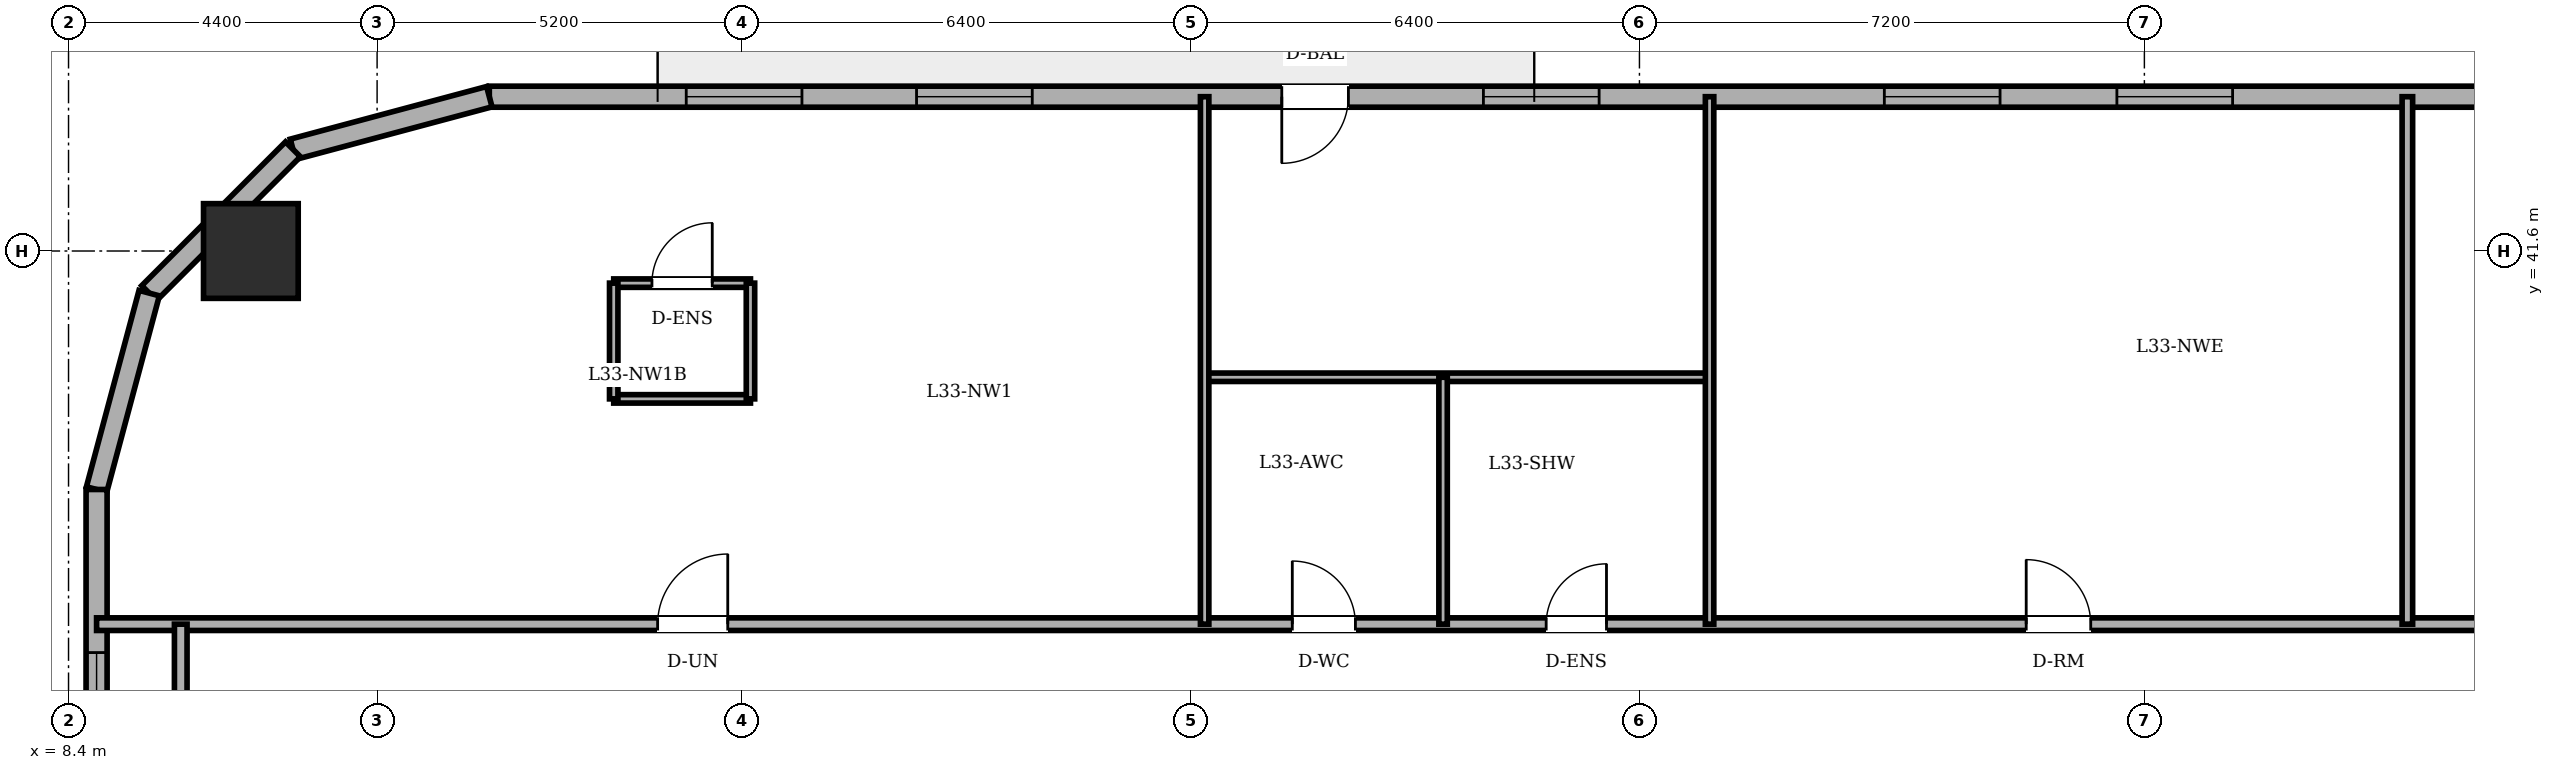
"""IFC4 building model, lengths in metres.
Left out: names, types, materials, properties, quantities, classifications, styles, units other than length and angle.
Written with IfcOpenShell. Run it as: python <this file> out.ifc"""

import sys

from ifc_helpers import new_model, si_unit, direction, frame, frame_2d, origin, origin_2d, place, context, subcontext, project, spatial, rectangle, circle, extrude, element, fill, save


model = new_model("IFC4")
c1 = context("Model", 3, precision=1e-05, world=origin(), true_north=direction((0.0, 1.0)))
c2 = subcontext(c1, "Body", "Model", "MODEL_VIEW")
j1 = project(units=[si_unit("LENGTHUNIT", "METRE"), si_unit("PLANEANGLEUNIT", "RADIAN")], contexts=[c1])
p1 = place(None, origin())
s1 = spatial("IfcSite", under=j1, at=p1, CompositionType="ELEMENT")
p2 = place(p1, origin())
s2 = spatial("IfcBuilding", under=s1, at=p2, CompositionType="ELEMENT")
p3 = place(p2, frame((0.0, 0.0, 125.9)))
s3 = spatial("IfcBuildingStorey", under=s2, at=p3, CompositionType="ELEMENT", Elevation=125.9)
p4 = place(p3, frame((11.0, 41.6, 0.0), z_axis=(0.0, 0.0, 1.0), x_axis=(1.0, 0.0, 0.0)))
e1 = element("IfcColumn", 1, at=p4, inside=s3, PredefinedType="COLUMN", context=c2, shape_type="SweptSolid", body=[
    extrude(circle(Radius=0.675, at=origin_2d()), origin(), (0.0, 0.0, 1.0), 3.6),
])
p5 = place(p3, frame((44.333, 43.8, 0.0), z_axis=(0.0, 0.0, 1.0), x_axis=(-1.0, 0.0, 0.0)))
e2 = element("IfcWall", 2, at=p5, inside=s3, PredefinedType="SOLIDWALL", context=c2, shape_type="SweptSolid", body=[
    extrude(rectangle(XDim=29.933, YDim=0.3, at=frame_2d((14.967, 0.0))), origin(), (0.0, 0.0, 1.0), 3.4),
])
p6 = place(p5, frame((17.683, 0.0, 0.0)))
e3 = element("IfcOpeningElement", 3, at=p6, cuts=e2, PredefinedType="OPENING", context=c2, shape_type="SweptSolid", body=[
    extrude(rectangle(XDim=0.95, YDim=2.2, at=frame_2d((0.475, 1.1))), frame((0.0, 0.16, 0.0), z_axis=(0.0, -1.0, 0.0), x_axis=(1.0, 0.0, 0.0)), (0.0, 0.0, 1.0), 0.32),
])
p7 = place(p5, frame((5.075, 0.0, 0.85)))
e4 = element("IfcOpeningElement", 4, at=p7, cuts=e2, PredefinedType="OPENING", context=c2, shape_type="SweptSolid", body=[
    extrude(rectangle(XDim=1.65, YDim=1.55, at=frame_2d((0.825, 0.775))), frame((0.0, 0.16, 0.0), z_axis=(0.0, -1.0, 0.0), x_axis=(1.0, 0.0, 0.0)), (0.0, 0.0, 1.0), 0.32),
])
p8 = place(p5, frame((8.391, 0.0, 0.85)))
e5 = element("IfcOpeningElement", 5, at=p8, cuts=e2, PredefinedType="OPENING", context=c2, shape_type="SweptSolid", body=[
    extrude(rectangle(XDim=1.65, YDim=1.55, at=frame_2d((0.825, 0.775))), frame((0.0, 0.16, 0.0), z_axis=(0.0, -1.0, 0.0), x_axis=(1.0, 0.0, 0.0)), (0.0, 0.0, 1.0), 0.32),
])
p9 = place(p5, frame((14.108, 0.0, 0.85)))
e6 = element("IfcOpeningElement", 6, at=p9, cuts=e2, PredefinedType="OPENING", context=c2, shape_type="SweptSolid", body=[
    extrude(rectangle(XDim=1.65, YDim=1.55, at=frame_2d((0.825, 0.775))), frame((0.0, 0.16, 0.0), z_axis=(0.0, -1.0, 0.0), x_axis=(1.0, 0.0, 0.0)), (0.0, 0.0, 1.0), 0.32),
])
p10 = place(p5, frame((22.191, 0.0, 0.85)))
e7 = element("IfcOpeningElement", 7, at=p10, cuts=e2, PredefinedType="OPENING", context=c2, shape_type="SweptSolid", body=[
    extrude(rectangle(XDim=1.65, YDim=1.55, at=frame_2d((0.825, 0.775))), frame((0.0, 0.16, 0.0), z_axis=(0.0, -1.0, 0.0), x_axis=(1.0, 0.0, 0.0)), (0.0, 0.0, 1.0), 0.32),
])
p11 = place(p5, frame((25.475, 0.0, 0.85)))
e8 = element("IfcOpeningElement", 8, at=p11, cuts=e2, PredefinedType="OPENING", context=c2, shape_type="SweptSolid", body=[
    extrude(rectangle(XDim=1.65, YDim=1.55, at=frame_2d((0.825, 0.775))), frame((0.0, 0.16, 0.0), z_axis=(0.0, -1.0, 0.0), x_axis=(1.0, 0.0, 0.0)), (0.0, 0.0, 1.0), 0.32),
])
p12 = place(p3, frame((14.4, 43.8, 0.0), z_axis=(0.0, 0.0, 1.0), x_axis=(-0.965943540406, -0.258752926066, 0.0)))
e9 = element("IfcWall", 9, at=p12, inside=s3, PredefinedType="SOLIDWALL", context=c2, shape_type="SweptSolid", body=[
    extrude(rectangle(XDim=2.898, YDim=0.3, at=frame_2d((1.449, 0.0))), origin(), (0.0, 0.0, 1.0), 3.4),
])
p13 = place(p3, frame((11.6, 43.05, 0.0), z_axis=(0.0, 0.0, 1.0), x_axis=(-0.707106781187, -0.707106781187, 0.0)))
e10 = element("IfcWall", 10, at=p13, inside=s3, PredefinedType="SOLIDWALL", context=c2, shape_type="SweptSolid", body=[
    extrude(rectangle(XDim=2.899, YDim=0.3, at=frame_2d((1.45, 0.0))), origin(), (0.0, 0.0, 1.0), 3.4),
])
p14 = place(p3, frame((9.55, 41.0, 0.0), z_axis=(0.0, 0.0, 1.0), x_axis=(-0.258731875344, -0.96594917914, 0.0)))
e11 = element("IfcWall", 11, at=p14, inside=s3, PredefinedType="SOLIDWALL", context=c2, shape_type="SweptSolid", body=[
    extrude(rectangle(XDim=2.899, YDim=0.3, at=frame_2d((1.449, 0.0))), origin(), (0.0, 0.0, 1.0), 3.4),
])
p15 = place(p3, frame((8.8, 38.2, 0.0), z_axis=(0.0, 0.0, 1.0), x_axis=(0.0, -1.0, 0.0)))
e12 = element("IfcWall", 12, at=p15, inside=s3, PredefinedType="SOLIDWALL", context=c2, shape_type="SweptSolid", body=[
    extrude(rectangle(XDim=28.4, YDim=0.3, at=frame_2d((14.2, 0.0))), origin(), (0.0, 0.0, 1.0), 3.4),
])
p16 = place(p15, frame((2.325, 0.0, 0.85)))
e13 = element("IfcOpeningElement", 13, at=p16, cuts=e12, PredefinedType="OPENING", context=c2, shape_type="SweptSolid", body=[
    extrude(rectangle(XDim=1.65, YDim=1.55, at=frame_2d((0.825, 0.775))), frame((0.0, 0.16, 0.0), z_axis=(0.0, -1.0, 0.0), x_axis=(1.0, 0.0, 0.0)), (0.0, 0.0, 1.0), 0.32),
])
p17 = place(p15, frame((6.828, 0.0, 0.85)))
e14 = element("IfcOpeningElement", 14, at=p17, cuts=e12, PredefinedType="OPENING", context=c2, shape_type="SweptSolid", body=[
    extrude(rectangle(XDim=1.65, YDim=1.55, at=frame_2d((0.825, 0.775))), frame((0.0, 0.16, 0.0), z_axis=(0.0, -1.0, 0.0), x_axis=(1.0, 0.0, 0.0)), (0.0, 0.0, 1.0), 0.32),
])
p18 = place(p15, frame((10.102, 0.0, 0.85)))
e15 = element("IfcOpeningElement", 15, at=p18, cuts=e12, PredefinedType="OPENING", context=c2, shape_type="SweptSolid", body=[
    extrude(rectangle(XDim=1.65, YDim=1.55, at=frame_2d((0.825, 0.775))), frame((0.0, 0.16, 0.0), z_axis=(0.0, -1.0, 0.0), x_axis=(1.0, 0.0, 0.0)), (0.0, 0.0, 1.0), 0.32),
])
p19 = place(p15, frame((16.648, 0.0, 0.85)))
e16 = element("IfcOpeningElement", 16, at=p19, cuts=e12, PredefinedType="OPENING", context=c2, shape_type="SweptSolid", body=[
    extrude(rectangle(XDim=1.65, YDim=1.55, at=frame_2d((0.825, 0.775))), frame((0.0, 0.16, 0.0), z_axis=(0.0, -1.0, 0.0), x_axis=(1.0, 0.0, 0.0)), (0.0, 0.0, 1.0), 0.32),
])
p20 = place(p15, frame((19.922, 0.0, 0.85)))
e17 = element("IfcOpeningElement", 17, at=p20, cuts=e12, PredefinedType="OPENING", context=c2, shape_type="SweptSolid", body=[
    extrude(rectangle(XDim=1.65, YDim=1.55, at=frame_2d((0.825, 0.775))), frame((0.0, 0.16, 0.0), z_axis=(0.0, -1.0, 0.0), x_axis=(1.0, 0.0, 0.0)), (0.0, 0.0, 1.0), 0.32),
])
p21 = place(p15, frame((24.425, 0.0, 0.85)))
e18 = element("IfcOpeningElement", 18, at=p21, cuts=e12, PredefinedType="OPENING", context=c2, shape_type="SweptSolid", body=[
    extrude(rectangle(XDim=1.65, YDim=1.55, at=frame_2d((0.825, 0.775))), frame((0.0, 0.16, 0.0), z_axis=(0.0, -1.0, 0.0), x_axis=(1.0, 0.0, 0.0)), (0.0, 0.0, 1.0), 0.32),
])
p22 = place(p3, frame((16.174, 41.142, 0.0), z_axis=(0.0, 0.0, 1.0), x_axis=(1.0, 0.0, 0.0)))
e19 = element("IfcWall", 19, at=p22, inside=s3, PredefinedType="PARTITIONING", context=c2, shape_type="SweptSolid", body=[
    extrude(rectangle(XDim=1.95, YDim=0.12, at=frame_2d((0.975, 0.0))), origin(), (0.0, 0.0, 1.0), 3.4),
])
p23 = place(p22, frame((0.545, 0.0, 0.0)))
e20 = element("IfcOpeningElement", 20, at=p23, cuts=e19, PredefinedType="OPENING", context=c2, shape_type="SweptSolid", body=[
    extrude(rectangle(XDim=0.86, YDim=2.1, at=frame_2d((0.43, 1.05))), frame((0.0, 0.07, 0.0), z_axis=(0.0, -1.0, 0.0), x_axis=(1.0, 0.0, 0.0)), (0.0, 0.0, 1.0), 0.14),
])
p24 = place(p3, frame((18.124, 39.492, 0.0), z_axis=(0.0, 0.0, 1.0), x_axis=(-1.0, 0.0, 0.0)))
e21 = element("IfcWall", 21, at=p24, inside=s3, PredefinedType="PARTITIONING", context=c2, shape_type="SweptSolid", body=[
    extrude(rectangle(XDim=1.95, YDim=0.12, at=frame_2d((0.975, 0.0))), origin(), (0.0, 0.0, 1.0), 3.4),
])
for number, where, z_axis, x_axis in (
    (22, (16.174, 41.142, 0.0), (0.0, 0.0, 1.0), (0.0, -1.0, 0.0)),
    (23, (18.124, 39.492, 0.0), (0.0, 0.0, 1.0), (0.0, 1.0, 0.0)),
):
    element("IfcWall", number, at=place(p3, frame(where, z_axis=z_axis, x_axis=x_axis)), inside=s3, PredefinedType="PARTITIONING", context=c2, shape_type="SweptSolid", body=[
        extrude(rectangle(XDim=1.65, YDim=0.12, at=frame_2d((0.825, 0.0))), origin(), (0.0, 0.0, 1.0), 3.4),
    ])
p25 = place(p3, frame((8.8, 36.28, 0.0), z_axis=(0.0, 0.0, 1.0), x_axis=(1.0, 0.0, 0.0)))
e24 = element("IfcWall", 24, at=p25, inside=s3, PredefinedType="PARTITIONING", context=c2, shape_type="SweptSolid", body=[
    extrude(rectangle(XDim=47.141, YDim=0.18, at=frame_2d((23.57, 0.0))), origin(), (0.0, 0.0, 1.0), 3.4),
])
p26 = place(p25, frame((17.05, 0.0, 0.0)))
e25 = element("IfcOpeningElement", 25, at=p26, cuts=e24, PredefinedType="OPENING", context=c2, shape_type="SweptSolid", body=[
    extrude(rectangle(XDim=0.9, YDim=2.1, at=frame_2d((0.45, 1.05))), frame((0.0, 0.1, 0.0), z_axis=(0.0, -1.0, 0.0), x_axis=(1.0, 0.0, 0.0)), (0.0, 0.0, 1.0), 0.2),
])
p27 = place(p25, frame((20.67, 0.0, 0.0)))
e26 = element("IfcOpeningElement", 26, at=p27, cuts=e24, PredefinedType="OPENING", context=c2, shape_type="SweptSolid", body=[
    extrude(rectangle(XDim=0.86, YDim=2.1, at=frame_2d((0.43, 1.05))), frame((0.0, 0.1, 0.0), z_axis=(0.0, -1.0, 0.0), x_axis=(1.0, 0.0, 0.0)), (0.0, 0.0, 1.0), 0.2),
])
p28 = place(p25, frame((34.95, 0.0, 0.0)))
e27 = element("IfcOpeningElement", 27, at=p28, cuts=e24, PredefinedType="OPENING", context=c2, shape_type="SweptSolid", body=[
    extrude(rectangle(XDim=1.0, YDim=2.15, at=frame_2d((0.5, 1.075))), frame((0.0, 0.1, 0.0), z_axis=(0.0, -1.0, 0.0), x_axis=(1.0, 0.0, 0.0)), (0.0, 0.0, 1.0), 0.2),
])
p29 = place(p25, frame((8.0, 0.0, 0.0)))
e28 = element("IfcOpeningElement", 28, at=p29, cuts=e24, PredefinedType="OPENING", context=c2, shape_type="SweptSolid", body=[
    extrude(rectangle(XDim=1.0, YDim=2.15, at=frame_2d((0.5, 1.075))), frame((0.0, 0.1, 0.0), z_axis=(0.0, -1.0, 0.0), x_axis=(1.0, 0.0, 0.0)), (0.0, 0.0, 1.0), 0.2),
])
p30 = place(p25, frame((27.515, 0.0, 0.0)))
e29 = element("IfcOpeningElement", 29, at=p30, cuts=e24, PredefinedType="OPENING", context=c2, shape_type="SweptSolid", body=[
    extrude(rectangle(XDim=0.92, YDim=2.1, at=frame_2d((0.46, 1.05))), frame((0.0, 0.1, 0.0), z_axis=(0.0, -1.0, 0.0), x_axis=(1.0, 0.0, 0.0)), (0.0, 0.0, 1.0), 0.2),
])
p31 = place(p3, frame((24.6, 39.8, 0.0), z_axis=(0.0, 0.0, 1.0), x_axis=(1.0, 0.0, 0.0)))
e30 = element("IfcWall", 30, at=p31, inside=s3, PredefinedType="PARTITIONING", context=c2, shape_type="SweptSolid", body=[
    extrude(rectangle(XDim=7.2, YDim=0.12, at=frame_2d((3.6, 0.0))), origin(), (0.0, 0.0, 1.0), 3.4),
])
p32 = place(p3, frame((10.0, 33.82, 0.0), z_axis=(0.0, 0.0, 1.0), x_axis=(0.0, 1.0, 0.0)))
e31 = element("IfcWall", 31, at=p32, inside=s3, PredefinedType="PARTITIONING", context=c2, shape_type="SweptSolid", body=[
    extrude(rectangle(XDim=2.46, YDim=0.18, at=frame_2d((1.23, 0.0))), origin(), (0.0, 0.0, 1.0), 3.4),
])
p33 = place(p3, frame((24.6, 36.28, 0.0), z_axis=(0.0, 0.0, 1.0), x_axis=(0.0, 1.0, 0.0)))
e32 = element("IfcWall", 32, at=p33, inside=s3, PredefinedType="PARTITIONING", context=c2, shape_type="SweptSolid", body=[
    extrude(rectangle(XDim=7.52, YDim=0.12, at=frame_2d((3.76, 0.0))), origin(), (0.0, 0.0, 1.0), 3.4),
])
p34 = place(p3, frame((28.0, 36.28, 0.0), z_axis=(0.0, 0.0, 1.0), x_axis=(0.0, 1.0, 0.0)))
e33 = element("IfcWall", 33, at=p34, inside=s3, PredefinedType="PARTITIONING", context=c2, shape_type="SweptSolid", body=[
    extrude(rectangle(XDim=3.52, YDim=0.12, at=frame_2d((1.76, 0.0))), origin(), (0.0, 0.0, 1.0), 3.4),
])
p35 = place(p3, frame((31.8, 36.28, 0.0), z_axis=(0.0, 0.0, 1.0), x_axis=(0.0, 1.0, 0.0)))
e34 = element("IfcWall", 34, at=p35, inside=s3, PredefinedType="PARTITIONING", context=c2, shape_type="SweptSolid", body=[
    extrude(rectangle(XDim=7.52, YDim=0.12, at=frame_2d((3.76, 0.0))), origin(), (0.0, 0.0, 1.0), 3.4),
])
p36 = place(p3, frame((41.75, 36.28, 0.0), z_axis=(0.0, 0.0, 1.0), x_axis=(0.0, 1.0, 0.0)))
e35 = element("IfcWall", 35, at=p36, inside=s3, PredefinedType="PARTITIONING", context=c2, shape_type="SweptSolid", body=[
    extrude(rectangle(XDim=7.52, YDim=0.15, at=frame_2d((3.76, 0.0))), origin(), (0.0, 0.0, 1.0), 3.4),
])
p37 = place(p6, origin())
e36 = element("IfcDoor", 36, at=p37, inside=s3, OperationType="SINGLE_SWING_RIGHT", PredefinedType="DOOR", context=c2, shape_type="SweptSolid", body=[
    extrude(rectangle(XDim=0.95, YDim=2.2, at=frame_2d((0.475, 1.1))), frame((0.0, 0.025, 0.0), z_axis=(0.0, -1.0, 0.0), x_axis=(1.0, 0.0, 0.0)), (0.0, 0.0, 1.0), 0.05),
])
fill(e3, e36)
p38 = place(p7, origin())
e37 = element("IfcWindow", 37, at=p38, inside=s3, PartitioningType="DOUBLE_PANEL_VERTICAL", PredefinedType="WINDOW", context=c2, shape_type="SweptSolid", body=[
    extrude(rectangle(XDim=1.65, YDim=1.55, at=frame_2d((0.825, 0.775))), frame((0.0, 0.03, 0.0), z_axis=(0.0, -1.0, 0.0), x_axis=(1.0, 0.0, 0.0)), (0.0, 0.0, 1.0), 0.06),
])
fill(e4, e37)
p39 = place(p8, origin())
e38 = element("IfcWindow", 38, at=p39, inside=s3, PartitioningType="DOUBLE_PANEL_VERTICAL", PredefinedType="WINDOW", context=c2, shape_type="SweptSolid", body=[
    extrude(rectangle(XDim=1.65, YDim=1.55, at=frame_2d((0.825, 0.775))), frame((0.0, 0.03, 0.0), z_axis=(0.0, -1.0, 0.0), x_axis=(1.0, 0.0, 0.0)), (0.0, 0.0, 1.0), 0.06),
])
fill(e5, e38)
p40 = place(p9, origin())
e39 = element("IfcWindow", 39, at=p40, inside=s3, PartitioningType="DOUBLE_PANEL_VERTICAL", PredefinedType="WINDOW", context=c2, shape_type="SweptSolid", body=[
    extrude(rectangle(XDim=1.65, YDim=1.55, at=frame_2d((0.825, 0.775))), frame((0.0, 0.03, 0.0), z_axis=(0.0, -1.0, 0.0), x_axis=(1.0, 0.0, 0.0)), (0.0, 0.0, 1.0), 0.06),
])
fill(e6, e39)
p41 = place(p10, origin())
e40 = element("IfcWindow", 40, at=p41, inside=s3, PartitioningType="DOUBLE_PANEL_VERTICAL", PredefinedType="WINDOW", context=c2, shape_type="SweptSolid", body=[
    extrude(rectangle(XDim=1.65, YDim=1.55, at=frame_2d((0.825, 0.775))), frame((0.0, 0.03, 0.0), z_axis=(0.0, -1.0, 0.0), x_axis=(1.0, 0.0, 0.0)), (0.0, 0.0, 1.0), 0.06),
])
fill(e7, e40)
p42 = place(p11, origin())
e41 = element("IfcWindow", 41, at=p42, inside=s3, PartitioningType="DOUBLE_PANEL_VERTICAL", PredefinedType="WINDOW", context=c2, shape_type="SweptSolid", body=[
    extrude(rectangle(XDim=1.65, YDim=1.55, at=frame_2d((0.825, 0.775))), frame((0.0, 0.03, 0.0), z_axis=(0.0, -1.0, 0.0), x_axis=(1.0, 0.0, 0.0)), (0.0, 0.0, 1.0), 0.06),
])
fill(e8, e41)
p43 = place(p16, origin())
e42 = element("IfcWindow", 42, at=p43, inside=s3, PartitioningType="DOUBLE_PANEL_VERTICAL", PredefinedType="WINDOW", context=c2, shape_type="SweptSolid", body=[
    extrude(rectangle(XDim=1.65, YDim=1.55, at=frame_2d((0.825, 0.775))), frame((0.0, 0.03, 0.0), z_axis=(0.0, -1.0, 0.0), x_axis=(1.0, 0.0, 0.0)), (0.0, 0.0, 1.0), 0.06),
])
fill(e13, e42)
p44 = place(p23, origin())
e43 = element("IfcDoor", 43, at=p44, inside=s3, OperationType="SINGLE_SWING_RIGHT", PredefinedType="DOOR", context=c2, shape_type="SweptSolid", body=[
    extrude(rectangle(XDim=0.86, YDim=2.1, at=frame_2d((0.43, 1.05))), frame((0.0, 0.025, 0.0), z_axis=(0.0, -1.0, 0.0), x_axis=(1.0, 0.0, 0.0)), (0.0, 0.0, 1.0), 0.05),
])
fill(e20, e43)
p45 = place(p26, origin())
e44 = element("IfcDoor", 44, at=p45, inside=s3, OperationType="SINGLE_SWING_LEFT", PredefinedType="DOOR", context=c2, shape_type="SweptSolid", body=[
    extrude(rectangle(XDim=0.9, YDim=2.1, at=frame_2d((0.45, 1.05))), frame((0.0, 0.025, 0.0), z_axis=(0.0, -1.0, 0.0), x_axis=(1.0, 0.0, 0.0)), (0.0, 0.0, 1.0), 0.05),
])
fill(e25, e44)
p46 = place(p27, origin())
e45 = element("IfcDoor", 45, at=p46, inside=s3, OperationType="SINGLE_SWING_RIGHT", PredefinedType="DOOR", context=c2, shape_type="SweptSolid", body=[
    extrude(rectangle(XDim=0.86, YDim=2.1, at=frame_2d((0.43, 1.05))), frame((0.0, 0.025, 0.0), z_axis=(0.0, -1.0, 0.0), x_axis=(1.0, 0.0, 0.0)), (0.0, 0.0, 1.0), 0.05),
])
fill(e26, e45)
p47 = place(p29, origin())
e46 = element("IfcDoor", 46, at=p47, inside=s3, OperationType="SINGLE_SWING_RIGHT", PredefinedType="DOOR", context=c2, shape_type="SweptSolid", body=[
    extrude(rectangle(XDim=1.0, YDim=2.15, at=frame_2d((0.5, 1.075))), frame((0.0, 0.025, 0.0), z_axis=(0.0, -1.0, 0.0), x_axis=(1.0, 0.0, 0.0)), (0.0, 0.0, 1.0), 0.05),
])
fill(e28, e46)
p48 = place(p30, origin())
e47 = element("IfcDoor", 47, at=p48, inside=s3, OperationType="SINGLE_SWING_LEFT", PredefinedType="DOOR", context=c2, shape_type="SweptSolid", body=[
    extrude(rectangle(XDim=0.92, YDim=2.1, at=frame_2d((0.46, 1.05))), frame((0.0, 0.025, 0.0), z_axis=(0.0, -1.0, 0.0), x_axis=(1.0, 0.0, 0.0)), (0.0, 0.0, 1.0), 0.05),
])
fill(e29, e47)
save(model, sys.argv[1])
